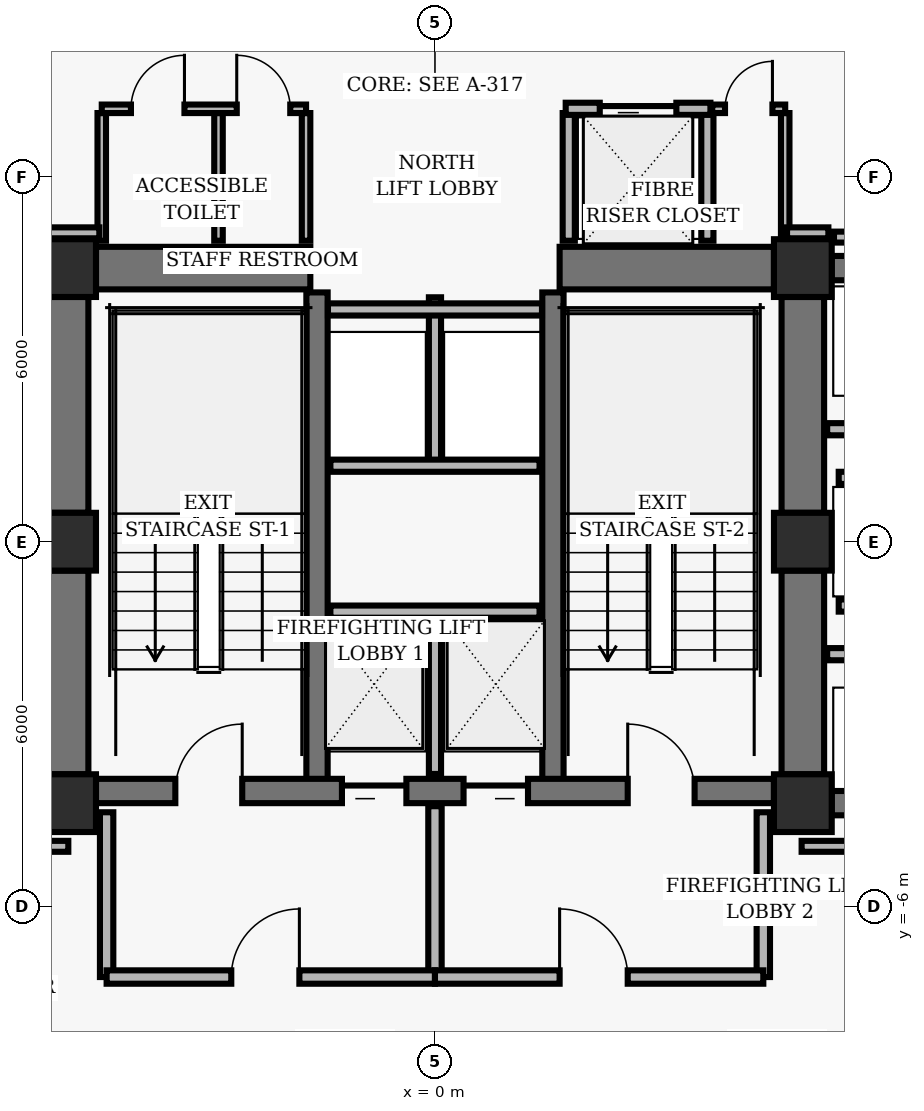
"""IFC4 building model, lengths in metres.
Left out: names, types, materials, properties, quantities, classifications, styles, units other than length and angle.
Written with IfcOpenShell. Run it as: python <this file> out.ifc"""

import sys

from ifc_helpers import new_model, si_unit, direction, frame, frame_2d, origin, origin_2d, place, context, subcontext, project, spatial, rectangle, hollow_rectangle, extrude, element, fill, save


model = new_model("IFC4")
c1 = context("Model", 3, precision=1e-05, world=origin(), true_north=direction((0.0, 1.0)))
c2 = subcontext(c1, "Body", "Model", "MODEL_VIEW")
j1 = project(units=[si_unit("LENGTHUNIT", "METRE"), si_unit("PLANEANGLEUNIT", "RADIAN")], contexts=[c1])
p1 = place(None, origin())
s1 = spatial("IfcSite", under=j1, at=p1, CompositionType="ELEMENT")
p2 = place(p1, origin())
s2 = spatial("IfcBuilding", under=s1, at=p2, CompositionType="ELEMENT")
p3 = place(p2, frame((0.0, 0.0, 76.48)))
s3 = spatial("IfcBuildingStorey", under=s2, at=p3, CompositionType="ELEMENT", Elevation=76.48)
for number, where, z_axis, x_axis in (
    (1, (-6.05, 4.5, 0.0), (0.0, 0.0, 1.0), (1.0, 0.0, 0.0)),
    (2, (6.05, 4.5, 0.0), (0.0, 0.0, 1.0), (1.0, 0.0, 0.0)),
    (3, (-6.05, 0.0, 0.0), (0.0, 0.0, 1.0), (1.0, 0.0, 0.0)),
    (4, (6.05, 0.0, 0.0), (0.0, 0.0, 1.0), (1.0, 0.0, 0.0)),
    (5, (-6.05, -4.3, 0.0), (0.0, 0.0, 1.0), (1.0, 0.0, 0.0)),
    (6, (6.05, -4.3, 0.0), (0.0, 0.0, 1.0), (1.0, 0.0, 0.0)),
):
    element("IfcColumn", number, at=place(p3, frame(where, z_axis=z_axis, x_axis=x_axis)), inside=s3, PredefinedType="COLUMN", context=c2, shape_type="SweptSolid", body=[
        extrude(hollow_rectangle(XDim=0.95, YDim=0.95, WallThickness=0.06, InnerFilletRadius=0.02, OuterFilletRadius=0.04, at=origin_2d()), origin(), (0.0, 0.0, 1.0), 3.04),
    ])
p4 = place(p3, frame((-6.05, 0.475, 0.0), z_axis=(0.0, 0.0, 1.0), x_axis=(0.0, 1.0, 0.0)))
e7 = element("IfcWall", 7, at=p4, inside=s3, PredefinedType="SHEAR", context=c2, shape_type="SweptSolid", body=[
    extrude(rectangle(XDim=3.55, YDim=0.7, at=frame_2d((1.775, 0.0))), origin(), (0.0, 0.0, 1.0), 2.788),
])
p5 = place(p3, frame((-6.05, -3.825, 0.0), z_axis=(0.0, 0.0, 1.0), x_axis=(0.0, 1.0, 0.0)))
e8 = element("IfcWall", 8, at=p5, inside=s3, PredefinedType="SHEAR", context=c2, shape_type="SweptSolid", body=[
    extrude(rectangle(XDim=3.35, YDim=0.7, at=frame_2d((1.675, 0.0))), origin(), (0.0, 0.0, 1.0), 2.788),
])
p6 = place(p3, frame((6.05, 0.475, 0.0), z_axis=(0.0, 0.0, 1.0), x_axis=(0.0, 1.0, 0.0)))
e9 = element("IfcWall", 9, at=p6, inside=s3, PredefinedType="SHEAR", context=c2, shape_type="SweptSolid", body=[
    extrude(rectangle(XDim=3.55, YDim=0.7, at=frame_2d((1.775, 0.0))), origin(), (0.0, 0.0, 1.0), 2.788),
])
p7 = place(p3, frame((6.05, -3.825, 0.0), z_axis=(0.0, 0.0, 1.0), x_axis=(0.0, 1.0, 0.0)))
e10 = element("IfcWall", 10, at=p7, inside=s3, PredefinedType="SHEAR", context=c2, shape_type="SweptSolid", body=[
    extrude(rectangle(XDim=3.35, YDim=0.7, at=frame_2d((1.675, 0.0))), origin(), (0.0, 0.0, 1.0), 2.788),
])
for number, where, z_axis, x_axis in (
    (11, (-1.94, -4.1, 0.0), (0.0, 0.0, 1.0), (0.0, 1.0, 0.0)),
    (12, (1.94, -4.1, 0.0), (0.0, 0.0, 1.0), (0.0, 1.0, 0.0)),
):
    element("IfcWall", number, at=place(p3, frame(where, z_axis=z_axis, x_axis=x_axis)), inside=s3, PredefinedType="SHEAR", context=c2, shape_type="SweptSolid", body=[
        extrude(rectangle(XDim=8.2, YDim=0.35, at=frame_2d((4.1, 0.0))), origin(), (0.0, 0.0, 1.0), 2.788),
    ])
p8 = place(p3, frame((-5.575, -4.1, 0.0), z_axis=(0.0, 0.0, 1.0), x_axis=(1.0, 0.0, 0.0)))
e13 = element("IfcWall", 13, at=p8, inside=s3, PredefinedType="SHEAR", context=c2, shape_type="SweptSolid", body=[
    extrude(rectangle(XDim=11.15, YDim=0.4, at=frame_2d((5.575, 0.0))), origin(), (0.0, 0.0, 1.0), 2.788),
])
p9 = place(p8, frame((1.305, 0.0, 0.0)))
e14 = element("IfcOpeningElement", 14, at=p9, cuts=e13, PredefinedType="OPENING", context=c2, shape_type="SweptSolid", body=[
    extrude(rectangle(XDim=1.1, YDim=2.04, at=frame_2d((0.55, 1.02))), frame((0.0, 0.21, 0.0), z_axis=(0.0, -1.0, 0.0), x_axis=(1.0, 0.0, 0.0)), (0.0, 0.0, 1.0), 0.42),
])
p10 = place(p8, frame((8.745, 0.0, 0.0)))
e15 = element("IfcOpeningElement", 15, at=p10, cuts=e13, PredefinedType="OPENING", context=c2, shape_type="SweptSolid", body=[
    extrude(rectangle(XDim=1.1, YDim=2.04, at=frame_2d((0.55, 1.02))), frame((0.0, 0.21, 0.0), z_axis=(0.0, -1.0, 0.0), x_axis=(1.0, 0.0, 0.0)), (0.0, 0.0, 1.0), 0.42),
])
p11 = place(p8, frame((4.045, 0.0, 0.0)))
e16 = element("IfcOpeningElement", 16, at=p11, cuts=e13, PredefinedType="OPENING", context=c2, shape_type="SweptSolid", body=[
    extrude(rectangle(XDim=1.06, YDim=2.04, at=frame_2d((0.53, 1.02))), frame((0.0, 0.21, 0.0), z_axis=(0.0, -1.0, 0.0), x_axis=(1.0, 0.0, 0.0)), (0.0, 0.0, 1.0), 0.42),
])
p12 = place(p8, frame((6.045, 0.0, 0.0)))
e17 = element("IfcOpeningElement", 17, at=p12, cuts=e13, PredefinedType="OPENING", context=c2, shape_type="SweptSolid", body=[
    extrude(rectangle(XDim=1.06, YDim=2.04, at=frame_2d((0.53, 1.02))), frame((0.0, 0.21, 0.0), z_axis=(0.0, -1.0, 0.0), x_axis=(1.0, 0.0, 0.0)), (0.0, 0.0, 1.0), 0.42),
])
for number, where, z_axis, x_axis in (
    (18, (-5.575, 4.5, 0.0), (0.0, 0.0, 1.0), (1.0, 0.0, 0.0)),
    (19, (2.05, 4.5, 0.0), (0.0, 0.0, 1.0), (1.0, 0.0, 0.0)),
):
    element("IfcWall", number, at=place(p3, frame(where, z_axis=z_axis, x_axis=x_axis)), inside=s3, PredefinedType="SHEAR", context=c2, shape_type="SweptSolid", body=[
        extrude(rectangle(XDim=3.525, YDim=0.7, at=frame_2d((1.762, 0.0))), origin(), (0.0, 0.0, 1.0), 2.788),
    ])
for number, where, z_axis, x_axis in (
    (20, (6.525, 4.5, 0.0), (0.0, 0.0, 1.0), (1.0, 0.0, 0.0)),
    (21, (6.525, -4.3, 0.0), (0.0, 0.0, 1.0), (1.0, 0.0, 0.0)),
):
    element("IfcWall", number, at=place(p3, frame(where, z_axis=z_axis, x_axis=x_axis)), inside=s3, PredefinedType="SHEAR", context=c2, shape_type="SweptSolid", body=[
        extrude(rectangle(XDim=1.95, YDim=0.4, at=frame_2d((0.975, 0.0))), origin(), (0.0, 0.0, 1.0), 2.788),
    ])
p13 = place(p3, frame((0.0, -3.82, 0.0), z_axis=(0.0, 0.0, 1.0), x_axis=(0.0, 1.0, 0.0)))
e22 = element("IfcWall", 22, at=p13, inside=s3, PredefinedType="PARTITIONING", context=c2, shape_type="SweptSolid", body=[
    extrude(rectangle(XDim=2.67, YDim=0.2, at=frame_2d((1.335, 0.0))), origin(), (0.0, 0.0, 1.0), 2.763),
])
p14 = place(p3, frame((-1.72, -1.15, 0.0), z_axis=(0.0, 0.0, 1.0), x_axis=(1.0, 0.0, 0.0)))
e23 = element("IfcWall", 23, at=p14, inside=s3, PredefinedType="PARTITIONING", context=c2, shape_type="SweptSolid", body=[
    extrude(rectangle(XDim=3.44, YDim=0.2, at=frame_2d((1.72, 0.0))), origin(), (0.0, 0.0, 1.0), 2.763),
])
for number, where, z_axis, x_axis in (
    (24, (-5.4, -7.16, 0.0), (0.0, 0.0, 1.0), (0.0, 1.0, 0.0)),
    (25, (5.4, -7.16, 0.0), (0.0, 0.0, 1.0), (0.0, 1.0, 0.0)),
):
    element("IfcWall", number, at=place(p3, frame(where, z_axis=z_axis, x_axis=x_axis)), inside=s3, PredefinedType="PARTITIONING", context=c2, shape_type="SweptSolid", body=[
        extrude(rectangle(XDim=2.71, YDim=0.22, at=frame_2d((1.355, 0.0))), origin(), (0.0, 0.0, 1.0), 2.763),
    ])
p15 = place(p3, frame((0.0, -7.16, 0.0), z_axis=(0.0, 0.0, 1.0), x_axis=(0.0, 1.0, 0.0)))
e26 = element("IfcWall", 26, at=p15, inside=s3, PredefinedType="PARTITIONING", context=c2, shape_type="SweptSolid", body=[
    extrude(rectangle(XDim=2.81, YDim=0.22, at=frame_2d((1.405, 0.0))), origin(), (0.0, 0.0, 1.0), 2.763),
])
p16 = place(p3, frame((-5.4, -7.16, 0.0), z_axis=(0.0, 0.0, 1.0), x_axis=(1.0, 0.0, 0.0)))
e27 = element("IfcWall", 27, at=p16, inside=s3, PredefinedType="PARTITIONING", context=c2, shape_type="SweptSolid", body=[
    extrude(rectangle(XDim=5.4, YDim=0.22, at=frame_2d((2.7, 0.0))), origin(), (0.0, 0.0, 1.0), 2.763),
])
p17 = place(p16, frame((2.05, 0.0, 0.0)))
e28 = element("IfcOpeningElement", 28, at=p17, cuts=e27, PredefinedType="OPENING", context=c2, shape_type="SweptSolid", body=[
    extrude(rectangle(XDim=1.12, YDim=2.02, at=frame_2d((0.56, 1.01))), frame((0.0, 0.12, 0.0), z_axis=(0.0, -1.0, 0.0), x_axis=(1.0, 0.0, 0.0)), (0.0, 0.0, 1.0), 0.24),
])
p18 = place(p3, frame((0.0, -7.16, 0.0), z_axis=(0.0, 0.0, 1.0), x_axis=(1.0, 0.0, 0.0)))
e29 = element("IfcWall", 29, at=p18, inside=s3, PredefinedType="PARTITIONING", context=c2, shape_type="SweptSolid", body=[
    extrude(rectangle(XDim=5.4, YDim=0.22, at=frame_2d((2.7, 0.0))), origin(), (0.0, 0.0, 1.0), 2.763),
])
p19 = place(p18, frame((2.05, 0.0, 0.0)))
e30 = element("IfcOpeningElement", 30, at=p19, cuts=e29, PredefinedType="OPENING", context=c2, shape_type="SweptSolid", body=[
    extrude(rectangle(XDim=1.12, YDim=2.02, at=frame_2d((0.56, 1.01))), frame((0.0, 0.12, 0.0), z_axis=(0.0, -1.0, 0.0), x_axis=(1.0, 0.0, 0.0)), (0.0, 0.0, 1.0), 0.24),
])
p20 = place(p3, frame((0.0, 1.25, 0.0), z_axis=(0.0, 0.0, 1.0), x_axis=(0.0, 1.0, 0.0)))
e31 = element("IfcWall", 31, at=p20, inside=s3, PredefinedType="PARTITIONING", context=c2, shape_type="SweptSolid", body=[
    extrude(rectangle(XDim=2.77, YDim=0.2, at=frame_2d((1.385, 0.0))), origin(), (0.0, 0.0, 1.0), 2.763),
])
p21 = place(p3, frame((-1.72, 1.25, 0.0), z_axis=(0.0, 0.0, 1.0), x_axis=(1.0, 0.0, 0.0)))
e32 = element("IfcWall", 32, at=p21, inside=s3, PredefinedType="PARTITIONING", context=c2, shape_type="SweptSolid", body=[
    extrude(rectangle(XDim=3.44, YDim=0.2, at=frame_2d((1.72, 0.0))), origin(), (0.0, 0.0, 1.0), 2.763),
])
p22 = place(p3, frame((-1.76, 3.82, 0.0), z_axis=(0.0, 0.0, 1.0), x_axis=(1.0, 0.0, 0.0)))
e33 = element("IfcWall", 33, at=p22, inside=s3, PredefinedType="PARTITIONING", context=c2, shape_type="SweptSolid", body=[
    extrude(rectangle(XDim=3.52, YDim=0.2, at=frame_2d((1.76, 0.0))), origin(), (0.0, 0.0, 1.0), 2.763),
])
for number, where, z_axis, x_axis in (
    (34, (2.2, 4.95, 0.0), (0.0, 0.0, 1.0), (0.0, 1.0, 0.0)),
    (35, (4.48, 4.95, 0.0), (0.0, 0.0, 1.0), (0.0, 1.0, 0.0)),
):
    element("IfcWall", number, at=place(p3, frame(where, z_axis=z_axis, x_axis=x_axis)), inside=s3, PredefinedType="PARTITIONING", context=c2, shape_type="SweptSolid", body=[
        extrude(rectangle(XDim=2.1, YDim=0.2, at=frame_2d((1.05, 0.0))), origin(), (0.0, 0.0, 1.0), 2.763),
    ])
p23 = place(p3, frame((2.15, 7.12, 0.0), z_axis=(0.0, 0.0, 1.0), x_axis=(1.0, 0.0, 0.0)))
e36 = element("IfcWall", 36, at=p23, inside=s3, PredefinedType="PARTITIONING", context=c2, shape_type="SweptSolid", body=[
    extrude(rectangle(XDim=2.38, YDim=0.2, at=frame_2d((1.19, 0.0))), origin(), (0.0, 0.0, 1.0), 2.763),
])
p24 = place(p23, frame((0.56, 0.0, 0.0)))
e37 = element("IfcOpeningElement", 37, at=p24, cuts=e36, PredefinedType="OPENING", context=c2, shape_type="SweptSolid", body=[
    extrude(rectangle(XDim=1.26, YDim=2.06, at=frame_2d((0.63, 1.03))), frame((0.0, 0.11, 0.0), z_axis=(0.0, -1.0, 0.0), x_axis=(1.0, 0.0, 0.0)), (0.0, 0.0, 1.0), 0.22),
])
for number, where, z_axis, x_axis in (
    (38, (-5.48, 4.95, 0.0), (0.0, 0.0, 1.0), (0.0, 1.0, 0.0)),
    (39, (-3.56, 4.95, 0.0), (0.0, 0.0, 1.0), (0.0, 1.0, 0.0)),
    (40, (-2.12, 4.95, 0.0), (0.0, 0.0, 1.0), (0.0, 1.0, 0.0)),
):
    element("IfcWall", number, at=place(p3, frame(where, z_axis=z_axis, x_axis=x_axis)), inside=s3, PredefinedType="PARTITIONING", context=c2, shape_type="SweptSolid", body=[
        extrude(rectangle(XDim=2.1, YDim=0.14, at=frame_2d((1.05, 0.0))), origin(), (0.0, 0.0, 1.0), 2.763),
    ])
p25 = place(p3, frame((-5.48, 7.12, 0.0), z_axis=(0.0, 0.0, 1.0), x_axis=(1.0, 0.0, 0.0)))
e41 = element("IfcWall", 41, at=p25, inside=s3, PredefinedType="PARTITIONING", context=c2, shape_type="SweptSolid", body=[
    extrude(rectangle(XDim=3.36, YDim=0.14, at=frame_2d((1.68, 0.0))), origin(), (0.0, 0.0, 1.0), 2.763),
])
p26 = place(p25, frame((0.48, 0.0, 0.0)))
e42 = element("IfcOpeningElement", 42, at=p26, cuts=e41, PredefinedType="OPENING", context=c2, shape_type="SweptSolid", body=[
    extrude(rectangle(XDim=0.88, YDim=2.02, at=frame_2d((0.44, 1.01))), frame((0.0, 0.08, 0.0), z_axis=(0.0, -1.0, 0.0), x_axis=(1.0, 0.0, 0.0)), (0.0, 0.0, 1.0), 0.16),
])
p27 = place(p25, frame((2.22, 0.0, 0.0)))
e43 = element("IfcOpeningElement", 43, at=p27, cuts=e41, PredefinedType="OPENING", context=c2, shape_type="SweptSolid", body=[
    extrude(rectangle(XDim=0.88, YDim=2.02, at=frame_2d((0.44, 1.01))), frame((0.0, 0.08, 0.0), z_axis=(0.0, -1.0, 0.0), x_axis=(1.0, 0.0, 0.0)), (0.0, 0.0, 1.0), 0.16),
])
p28 = place(p3, frame((5.76, 4.95, 0.0), z_axis=(0.0, 0.0, 1.0), x_axis=(0.0, 1.0, 0.0)))
e44 = element("IfcWall", 44, at=p28, inside=s3, PredefinedType="PARTITIONING", context=c2, shape_type="SweptSolid", body=[
    extrude(rectangle(XDim=2.1, YDim=0.14, at=frame_2d((1.05, 0.0))), origin(), (0.0, 0.0, 1.0), 2.763),
])
p29 = place(p3, frame((4.56, 7.12, 0.0), z_axis=(0.0, 0.0, 1.0), x_axis=(1.0, 0.0, 0.0)))
e45 = element("IfcWall", 45, at=p29, inside=s3, PredefinedType="PARTITIONING", context=c2, shape_type="SweptSolid", body=[
    extrude(rectangle(XDim=1.2, YDim=0.14, at=frame_2d((0.6, 0.0))), origin(), (0.0, 0.0, 1.0), 2.763),
])
p30 = place(p29, frame((0.21, 0.0, 0.0)))
e46 = element("IfcOpeningElement", 46, at=p30, cuts=e45, PredefinedType="OPENING", context=c2, shape_type="SweptSolid", body=[
    extrude(rectangle(XDim=0.78, YDim=2.01, at=frame_2d((0.39, 1.005))), frame((0.0, 0.08, 0.0), z_axis=(0.0, -1.0, 0.0), x_axis=(1.0, 0.0, 0.0)), (0.0, 0.0, 1.0), 0.16),
])
for number, where, z_axis, x_axis in (
    (47, (6.45, -1.85, 0.0), (0.0, 0.0, 1.0), (1.0, 0.0, 0.0)),
    (48, (6.45, 1.85, 0.0), (0.0, 0.0, 1.0), (1.0, 0.0, 0.0)),
):
    element("IfcWall", number, at=place(p3, frame(where, z_axis=z_axis, x_axis=x_axis)), inside=s3, PredefinedType="PARTITIONING", context=c2, shape_type="SweptSolid", body=[
        extrude(rectangle(XDim=2.1, YDim=0.2, at=frame_2d((1.05, 0.0))), origin(), (0.0, 0.0, 1.0), 2.763),
    ])
for number, where, z_axis, x_axis in (
    (49, (6.64, -1.05, 0.0), (0.0, 0.0, 1.0), (1.0, 0.0, 0.0)),
    (50, (6.64, 1.05, 0.0), (0.0, 0.0, 1.0), (1.0, 0.0, 0.0)),
):
    element("IfcWall", number, at=place(p3, frame(where, z_axis=z_axis, x_axis=x_axis)), inside=s3, PredefinedType="PARTITIONING", context=c2, shape_type="SweptSolid", body=[
        extrude(rectangle(XDim=1.91, YDim=0.2, at=frame_2d((0.955, 0.0))), origin(), (0.0, 0.0, 1.0), 2.763),
    ])
for number, where, z_axis, x_axis in (
    (51, (-9.37, -5.01, 0.0), (0.0, 0.0, 1.0), (1.0, 0.0, 0.0)),
    (52, (6.03, -5.01, 0.0), (0.0, 0.0, 1.0), (1.0, 0.0, 0.0)),
):
    element("IfcWall", number, at=place(p3, frame(where, z_axis=z_axis, x_axis=x_axis)), inside=s3, PredefinedType="PARTITIONING", context=c2, shape_type="SweptSolid", body=[
        extrude(rectangle(XDim=3.34, YDim=0.18, at=frame_2d((1.67, 0.0))), origin(), (0.0, 0.0, 1.0), 2.763),
    ])
p31 = place(p3, frame((9.37, 5.01, 0.0), z_axis=(0.0, 0.0, 1.0), x_axis=(-1.0, 0.0, 0.0)))
e53 = element("IfcWall", 53, at=p31, inside=s3, PredefinedType="PARTITIONING", context=c2, shape_type="SweptSolid", body=[
    extrude(rectangle(XDim=2.808, YDim=0.18, at=frame_2d((1.404, 0.0))), origin(), (0.0, 0.0, 1.0), 2.763),
])
p32 = place(p3, frame((6.47, 5.08, 0.0), z_axis=(0.0, 0.0, 1.0), x_axis=(-1.0, 0.0, 0.0)))
e54 = element("IfcWall", 54, at=p32, inside=s3, PredefinedType="PARTITIONING", context=c2, shape_type="SweptSolid", body=[
    extrude(rectangle(XDim=0.68, YDim=0.18, at=frame_2d((0.34, 0.0))), origin(), (0.0, 0.0, 1.0), 2.763),
])
p33 = place(p3, frame((-5.52, 5.08, 0.0), z_axis=(0.0, 0.0, 1.0), x_axis=(-1.0, 0.0, 0.0)))
e55 = element("IfcWall", 55, at=p33, inside=s3, PredefinedType="PARTITIONING", context=c2, shape_type="SweptSolid", body=[
    extrude(rectangle(XDim=0.95, YDim=0.18, at=frame_2d((0.475, 0.0))), origin(), (0.0, 0.0, 1.0), 2.763),
])
p34 = place(p9, origin())
e56 = element("IfcDoor", 56, at=p34, inside=s3, OperationType="SINGLE_SWING_RIGHT", PredefinedType="DOOR", context=c2, shape_type="SweptSolid", body=[
    extrude(rectangle(XDim=1.1, YDim=2.04, at=frame_2d((0.55, 1.02))), frame((0.0, 0.025, 0.0), z_axis=(0.0, -1.0, 0.0), x_axis=(1.0, 0.0, 0.0)), (0.0, 0.0, 1.0), 0.05),
])
fill(e14, e56)
p35 = place(p10, origin())
e57 = element("IfcDoor", 57, at=p35, inside=s3, OperationType="SINGLE_SWING_LEFT", PredefinedType="DOOR", context=c2, shape_type="SweptSolid", body=[
    extrude(rectangle(XDim=1.1, YDim=2.04, at=frame_2d((0.55, 1.02))), frame((0.0, 0.025, 0.0), z_axis=(0.0, -1.0, 0.0), x_axis=(1.0, 0.0, 0.0)), (0.0, 0.0, 1.0), 0.05),
])
fill(e15, e57)
p36 = place(p11, origin())
e58 = element("IfcDoor", 58, at=p36, inside=s3, OperationType="SLIDING_TO_LEFT", PredefinedType="DOOR", context=c2, shape_type="SweptSolid", body=[
    extrude(rectangle(XDim=1.06, YDim=2.04, at=frame_2d((0.53, 1.02))), frame((0.0, 0.025, 0.0), z_axis=(0.0, -1.0, 0.0), x_axis=(1.0, 0.0, 0.0)), (0.0, 0.0, 1.0), 0.05),
])
fill(e16, e58)
p37 = place(p12, origin())
e59 = element("IfcDoor", 59, at=p37, inside=s3, OperationType="SLIDING_TO_RIGHT", PredefinedType="DOOR", context=c2, shape_type="SweptSolid", body=[
    extrude(rectangle(XDim=1.06, YDim=2.04, at=frame_2d((0.53, 1.02))), frame((0.0, 0.025, 0.0), z_axis=(0.0, -1.0, 0.0), x_axis=(1.0, 0.0, 0.0)), (0.0, 0.0, 1.0), 0.05),
])
fill(e17, e59)
p38 = place(p17, origin())
e60 = element("IfcDoor", 60, at=p38, inside=s3, OperationType="SINGLE_SWING_RIGHT", PredefinedType="DOOR", context=c2, shape_type="SweptSolid", body=[
    extrude(rectangle(XDim=1.12, YDim=2.02, at=frame_2d((0.56, 1.01))), frame((0.0, 0.025, 0.0), z_axis=(0.0, -1.0, 0.0), x_axis=(1.0, 0.0, 0.0)), (0.0, 0.0, 1.0), 0.05),
])
fill(e28, e60)
p39 = place(p19, origin())
e61 = element("IfcDoor", 61, at=p39, inside=s3, OperationType="SINGLE_SWING_LEFT", PredefinedType="DOOR", context=c2, shape_type="SweptSolid", body=[
    extrude(rectangle(XDim=1.12, YDim=2.02, at=frame_2d((0.56, 1.01))), frame((0.0, 0.025, 0.0), z_axis=(0.0, -1.0, 0.0), x_axis=(1.0, 0.0, 0.0)), (0.0, 0.0, 1.0), 0.05),
])
fill(e30, e61)
p40 = place(p24, origin())
e62 = element("IfcDoor", 62, at=p40, inside=s3, OperationType="SLIDING_TO_LEFT", PredefinedType="DOOR", context=c2, shape_type="SweptSolid", body=[
    extrude(rectangle(XDim=1.26, YDim=2.06, at=frame_2d((0.63, 1.03))), frame((0.0, 0.025, 0.0), z_axis=(0.0, -1.0, 0.0), x_axis=(1.0, 0.0, 0.0)), (0.0, 0.0, 1.0), 0.05),
])
fill(e37, e62)
p41 = place(p26, origin())
e63 = element("IfcDoor", 63, at=p41, inside=s3, OperationType="SINGLE_SWING_RIGHT", PredefinedType="DOOR", context=c2, shape_type="SweptSolid", body=[
    extrude(rectangle(XDim=0.88, YDim=2.02, at=frame_2d((0.44, 1.01))), frame((0.0, 0.025, 0.0), z_axis=(0.0, -1.0, 0.0), x_axis=(1.0, 0.0, 0.0)), (0.0, 0.0, 1.0), 0.05),
])
fill(e42, e63)
p42 = place(p27, origin())
e64 = element("IfcDoor", 64, at=p42, inside=s3, OperationType="SINGLE_SWING_LEFT", PredefinedType="DOOR", context=c2, shape_type="SweptSolid", body=[
    extrude(rectangle(XDim=0.88, YDim=2.02, at=frame_2d((0.44, 1.01))), frame((0.0, 0.025, 0.0), z_axis=(0.0, -1.0, 0.0), x_axis=(1.0, 0.0, 0.0)), (0.0, 0.0, 1.0), 0.05),
])
fill(e43, e64)
p43 = place(p30, origin())
e65 = element("IfcDoor", 65, at=p43, inside=s3, OperationType="SINGLE_SWING_RIGHT", PredefinedType="DOOR", context=c2, shape_type="SweptSolid", body=[
    extrude(rectangle(XDim=0.78, YDim=2.01, at=frame_2d((0.39, 1.005))), frame((0.0, 0.025, 0.0), z_axis=(0.0, -1.0, 0.0), x_axis=(1.0, 0.0, 0.0)), (0.0, 0.0, 1.0), 0.05),
])
fill(e46, e65)
save(model, sys.argv[1])
